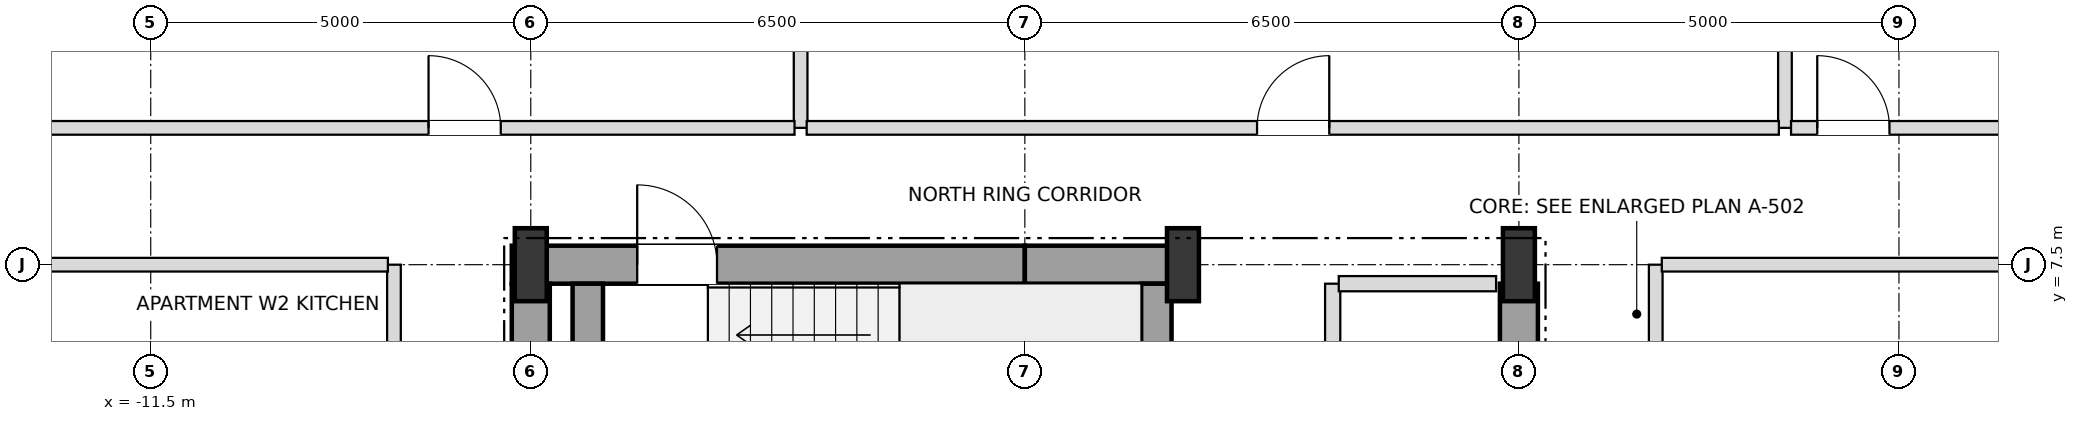
"""IFC4 building model, lengths in metres.
Left out: names, types, materials, properties, quantities, classifications, styles, units other than length and angle.
Written with IfcOpenShell. Run it as: python <this file> out.ifc"""

import sys

from ifc_helpers import new_model, si_unit, direction, frame, frame_2d, origin, origin_2d, place, context, subcontext, project, spatial, rectangle, i_section, extrude, element, fill, save


model = new_model("IFC4")
c1 = context("Model", 3, precision=1e-05, world=origin(), true_north=direction((0.0, 1.0)))
c2 = subcontext(c1, "Body", "Model", "MODEL_VIEW")
j1 = project(units=[si_unit("LENGTHUNIT", "METRE"), si_unit("PLANEANGLEUNIT", "RADIAN")], contexts=[c1])
p1 = place(None, origin())
s1 = spatial("IfcSite", under=j1, at=p1, CompositionType="ELEMENT")
p2 = place(p1, origin())
s2 = spatial("IfcBuilding", under=s1, at=p2, CompositionType="ELEMENT")
p3 = place(p2, frame((0.0, 0.0, 36.0)))
s3 = spatial("IfcBuildingStorey", under=s2, at=p3, CompositionType="ELEMENT", Elevation=36.0)
for number, where, z_axis, x_axis in (
    (1, (-6.5, 7.5, 0.0), (0.0, 0.0, 1.0), (1.0, 0.0, 0.0)),
    (2, (2.08, 7.5, 0.0), (0.0, 0.0, 1.0), (1.0, 0.0, 0.0)),
    (3, (6.5, 7.5, 0.0), (0.0, 0.0, 1.0), (1.0, 0.0, 0.0)),
):
    element("IfcColumn", number, at=place(p3, frame(where, z_axis=z_axis, x_axis=x_axis)), inside=s3, PredefinedType="COLUMN", context=c2, shape_type="SweptSolid", body=[
        extrude(i_section(OverallWidth=0.42, OverallDepth=0.96, WebThickness=0.022, FlangeThickness=0.034, at=origin_2d()), origin(), (0.0, 0.0, 1.0), 3.6),
    ])
p4 = place(p3, frame((-6.75, 7.5, 0.0), z_axis=(0.0, 0.0, 1.0), x_axis=(1.0, 0.0, 0.0)))
e4 = element("IfcWall", 4, at=p4, inside=s3, PredefinedType="SHEAR", context=c2, shape_type="SweptSolid", body=[
    extrude(rectangle(XDim=6.75, YDim=0.5, at=frame_2d((3.375, 0.0))), origin(), (0.0, 0.0, 1.0), 3.38),
])
p5 = place(p4, frame((1.65, 0.0, 0.0)))
e5 = element("IfcOpeningElement", 5, at=p5, cuts=e4, PredefinedType="OPENING", context=c2, shape_type="SweptSolid", body=[
    extrude(rectangle(XDim=1.05, YDim=2.15, at=frame_2d((0.525, 1.075))), frame((0.0, 0.26, 0.0), z_axis=(0.0, -1.0, 0.0), x_axis=(1.0, 0.0, 0.0)), (0.0, 0.0, 1.0), 0.52),
])
p6 = place(p3, frame((0.0, 7.5, 0.0), z_axis=(0.0, 0.0, 1.0), x_axis=(1.0, 0.0, 0.0)))
e6 = element("IfcWall", 6, at=p6, inside=s3, PredefinedType="SHEAR", context=c2, shape_type="SweptSolid", body=[
    extrude(rectangle(XDim=2.08, YDim=0.5, at=frame_2d((1.04, 0.0))), origin(), (0.0, 0.0, 1.0), 3.38),
])
for number, where, z_axis, x_axis in (
    (7, (-6.5, 3.95, 0.0), (0.0, 0.0, 1.0), (0.0, 1.0, 0.0)),
    (8, (6.5, 3.95, 0.0), (0.0, 0.0, 1.0), (0.0, 1.0, 0.0)),
):
    element("IfcWall", number, at=place(p3, frame(where, z_axis=z_axis, x_axis=x_axis)), inside=s3, PredefinedType="SHEAR", context=c2, shape_type="SweptSolid", body=[
        extrude(rectangle(XDim=3.3, YDim=0.5, at=frame_2d((1.65, 0.0))), origin(), (0.0, 0.0, 1.0), 3.38),
    ])
for number, where, z_axis, x_axis in (
    (9, (1.73, 3.95, 0.0), (0.0, 0.0, 1.0), (0.0, 1.0, 0.0)),
    (10, (-5.75, 3.95, 0.0), (0.0, 0.0, 1.0), (0.0, 1.0, 0.0)),
):
    element("IfcWall", number, at=place(p3, frame(where, z_axis=z_axis, x_axis=x_axis)), inside=s3, PredefinedType="SHEAR", context=c2, shape_type="SweptSolid", body=[
        extrude(rectangle(XDim=3.3, YDim=0.4, at=frame_2d((1.65, 0.0))), origin(), (0.0, 0.0, 1.0), 3.38),
    ])
p7 = place(p3, frame((-8.3, -7.5, 0.0), z_axis=(0.0, 0.0, 1.0), x_axis=(0.0, 1.0, 0.0)))
e11 = element("IfcWall", 11, at=p7, inside=s3, PredefinedType="PARTITIONING", context=c2, shape_type="SweptSolid", body=[
    extrude(rectangle(XDim=15.0, YDim=0.18, at=frame_2d((7.5, 0.0))), origin(), (0.0, 0.0, 1.0), 3.38),
])
p8 = place(p7, frame((3.565, 0.0, 0.0)))
e12 = element("IfcOpeningElement", 12, at=p8, cuts=e11, PredefinedType="OPENING", context=c2, shape_type="SweptSolid", body=[
    extrude(rectangle(XDim=0.95, YDim=2.15, at=frame_2d((0.475, 1.075))), frame((0.0, 0.1, 0.0), z_axis=(0.0, -1.0, 0.0), x_axis=(1.0, 0.0, 0.0)), (0.0, 0.0, 1.0), 0.2),
])
p9 = place(p7, frame((11.145, 0.0, 0.0)))
e13 = element("IfcOpeningElement", 13, at=p9, cuts=e11, PredefinedType="OPENING", context=c2, shape_type="SweptSolid", body=[
    extrude(rectangle(XDim=0.95, YDim=2.15, at=frame_2d((0.475, 1.075))), frame((0.0, 0.1, 0.0), z_axis=(0.0, -1.0, 0.0), x_axis=(1.0, 0.0, 0.0)), (0.0, 0.0, 1.0), 0.2),
])
p10 = place(p3, frame((-2.95, 9.3, 0.0), z_axis=(0.0, 0.0, 1.0), x_axis=(0.0, 1.0, 0.0)))
e14 = element("IfcWall", 14, at=p10, inside=s3, PredefinedType="PARTITIONING", context=c2, shape_type="SweptSolid", body=[
    extrude(rectangle(XDim=15.6, YDim=0.18, at=frame_2d((7.8, 0.0))), origin(), (0.0, 0.0, 1.0), 2.816),
])
p11 = place(p3, frame((4.05, 4.2, 0.0), z_axis=(0.0, 0.0, 1.0), x_axis=(0.0, 1.0, 0.0)))
e15 = element("IfcWall", 15, at=p11, inside=s3, PredefinedType="SOLIDWALL", context=c2, shape_type="SweptSolid", body=[
    extrude(rectangle(XDim=3.05, YDim=0.2, at=frame_2d((1.525, 0.0))), origin(), (0.0, 0.0, 1.0), 3.38),
])
p12 = place(p11, frame((0.975, 0.0, 0.0)))
e16 = element("IfcOpeningElement", 16, at=p12, cuts=e15, PredefinedType="OPENING", context=c2, shape_type="SweptSolid", body=[
    extrude(rectangle(XDim=0.95, YDim=2.15, at=frame_2d((0.475, 1.075))), frame((0.0, 0.11, 0.0), z_axis=(0.0, -1.0, 0.0), x_axis=(1.0, 0.0, 0.0)), (0.0, 0.0, 1.0), 0.22),
])
p13 = place(p3, frame((8.3, -7.5, 0.0), z_axis=(0.0, 0.0, 1.0), x_axis=(0.0, 1.0, 0.0)))
e17 = element("IfcWall", 17, at=p13, inside=s3, PredefinedType="PARTITIONING", context=c2, shape_type="SweptSolid", body=[
    extrude(rectangle(XDim=15.0, YDim=0.18, at=frame_2d((7.5, 0.0))), origin(), (0.0, 0.0, 1.0), 3.38),
])
p14 = place(p13, frame((3.475, 0.0, 0.0)))
e18 = element("IfcOpeningElement", 18, at=p14, cuts=e17, PredefinedType="OPENING", context=c2, shape_type="SweptSolid", body=[
    extrude(rectangle(XDim=0.95, YDim=2.15, at=frame_2d((0.475, 1.075))), frame((0.0, 0.1, 0.0), z_axis=(0.0, -1.0, 0.0), x_axis=(1.0, 0.0, 0.0)), (0.0, 0.0, 1.0), 0.2),
])
p15 = place(p3, frame((10.0, 9.3, 0.0), z_axis=(0.0, 0.0, 1.0), x_axis=(0.0, 1.0, 0.0)))
e19 = element("IfcWall", 19, at=p15, inside=s3, PredefinedType="PARTITIONING", context=c2, shape_type="SweptSolid", body=[
    extrude(rectangle(XDim=15.6, YDim=0.18, at=frame_2d((7.8, 0.0))), origin(), (0.0, 0.0, 1.0), 2.816),
])
p16 = place(p15, frame((8.635, 0.0, 0.0)))
e20 = element("IfcOpeningElement", 20, at=p16, cuts=e19, PredefinedType="OPENING", context=c2, shape_type="SweptSolid", body=[
    extrude(rectangle(XDim=0.95, YDim=2.15, at=frame_2d((0.475, 1.075))), frame((0.0, 0.1, 0.0), z_axis=(0.0, -1.0, 0.0), x_axis=(1.0, 0.0, 0.0)), (0.0, 0.0, 1.0), 0.2),
])
p17 = place(p3, frame((4.13, 7.25, 0.0), z_axis=(0.0, 0.0, 1.0), x_axis=(1.0, 0.0, 0.0)))
e21 = element("IfcWall", 21, at=p17, inside=s3, PredefinedType="SOLIDWALL", context=c2, shape_type="SweptSolid", body=[
    extrude(rectangle(XDim=2.07, YDim=0.2, at=frame_2d((1.035, 0.0))), origin(), (0.0, 0.0, 1.0), 3.38),
])
for number, where, z_axis, x_axis in (
    (22, (-16.02, 7.5, 0.0), (0.0, 0.0, 1.0), (1.0, 0.0, 0.0)),
    (23, (8.38, 7.5, 0.0), (0.0, 0.0, 1.0), (1.0, 0.0, 0.0)),
):
    element("IfcWall", number, at=place(p3, frame(where, z_axis=z_axis, x_axis=x_axis)), inside=s3, PredefinedType="PARTITIONING", context=c2, shape_type="SweptSolid", body=[
        extrude(rectangle(XDim=7.64, YDim=0.18, at=frame_2d((3.82, 0.0))), origin(), (0.0, 0.0, 1.0), 2.816),
    ])
p18 = place(p3, frame((-18.4, 9.3, 0.0), z_axis=(0.0, 0.0, 1.0), x_axis=(1.0, 0.0, 0.0)))
e24 = element("IfcWall", 24, at=p18, inside=s3, PredefinedType="PARTITIONING", context=c2, shape_type="SweptSolid", body=[
    extrude(rectangle(XDim=15.37, YDim=0.18, at=frame_2d((7.685, 0.0))), origin(), (0.0, 0.0, 1.0), 2.816),
])
p19 = place(p18, frame((10.555, 0.0, 0.0)))
e25 = element("IfcOpeningElement", 25, at=p19, cuts=e24, PredefinedType="OPENING", context=c2, shape_type="SweptSolid", body=[
    extrude(rectangle(XDim=0.95, YDim=2.15, at=frame_2d((0.475, 1.075))), frame((0.0, 0.1, 0.0), z_axis=(0.0, -1.0, 0.0), x_axis=(1.0, 0.0, 0.0)), (0.0, 0.0, 1.0), 0.2),
])
p20 = place(p3, frame((-2.87, 9.3, 0.0), z_axis=(0.0, 0.0, 1.0), x_axis=(1.0, 0.0, 0.0)))
e26 = element("IfcWall", 26, at=p20, inside=s3, PredefinedType="PARTITIONING", context=c2, shape_type="SweptSolid", body=[
    extrude(rectangle(XDim=12.79, YDim=0.18, at=frame_2d((6.395, 0.0))), origin(), (0.0, 0.0, 1.0), 2.816),
])
p21 = place(p20, frame((5.925, 0.0, 0.0)))
e27 = element("IfcOpeningElement", 27, at=p21, cuts=e26, PredefinedType="OPENING", context=c2, shape_type="SweptSolid", body=[
    extrude(rectangle(XDim=0.95, YDim=2.15, at=frame_2d((0.475, 1.075))), frame((0.0, 0.1, 0.0), z_axis=(0.0, -1.0, 0.0), x_axis=(1.0, 0.0, 0.0)), (0.0, 0.0, 1.0), 0.2),
])
p22 = place(p3, frame((10.08, 9.3, 0.0), z_axis=(0.0, 0.0, 1.0), x_axis=(1.0, 0.0, 0.0)))
e28 = element("IfcWall", 28, at=p22, inside=s3, PredefinedType="PARTITIONING", context=c2, shape_type="SweptSolid", body=[
    extrude(rectangle(XDim=8.24, YDim=0.18, at=frame_2d((4.12, 0.0))), origin(), (0.0, 0.0, 1.0), 2.816),
])
p23 = place(p22, frame((0.345, 0.0, 0.0)))
e29 = element("IfcOpeningElement", 29, at=p23, cuts=e28, PredefinedType="OPENING", context=c2, shape_type="SweptSolid", body=[
    extrude(rectangle(XDim=0.95, YDim=2.15, at=frame_2d((0.475, 1.075))), frame((0.0, 0.1, 0.0), z_axis=(0.0, -1.0, 0.0), x_axis=(1.0, 0.0, 0.0)), (0.0, 0.0, 1.0), 0.2),
])
p24 = place(p5, origin())
e30 = element("IfcDoor", 30, at=p24, inside=s3, OperationType="SINGLE_SWING_LEFT", PredefinedType="DOOR", context=c2, shape_type="SweptSolid", body=[
    extrude(rectangle(XDim=1.05, YDim=2.15, at=frame_2d((0.525, 1.075))), frame((0.0, 0.025, 0.0), z_axis=(0.0, -1.0, 0.0), x_axis=(1.0, 0.0, 0.0)), (0.0, 0.0, 1.0), 0.05),
])
fill(e5, e30)
p25 = place(p23, origin())
e31 = element("IfcDoor", 31, at=p25, inside=s3, OperationType="SINGLE_SWING_LEFT", PredefinedType="DOOR", context=c2, shape_type="SweptSolid", body=[
    extrude(rectangle(XDim=0.95, YDim=2.15, at=frame_2d((0.475, 1.075))), frame((0.0, 0.025, 0.0), z_axis=(0.0, -1.0, 0.0), x_axis=(1.0, 0.0, 0.0)), (0.0, 0.0, 1.0), 0.05),
])
fill(e29, e31)
p26 = place(p19, origin())
e32 = element("IfcDoor", 32, at=p26, inside=s3, OperationType="SINGLE_SWING_LEFT", PredefinedType="DOOR", context=c2, shape_type="SweptSolid", body=[
    extrude(rectangle(XDim=0.95, YDim=2.15, at=frame_2d((0.475, 1.075))), frame((0.0, 0.025, 0.0), z_axis=(0.0, -1.0, 0.0), x_axis=(1.0, 0.0, 0.0)), (0.0, 0.0, 1.0), 0.05),
])
fill(e25, e32)
p27 = place(p21, origin())
e33 = element("IfcDoor", 33, at=p27, inside=s3, OperationType="SINGLE_SWING_RIGHT", PredefinedType="DOOR", context=c2, shape_type="SweptSolid", body=[
    extrude(rectangle(XDim=0.95, YDim=2.15, at=frame_2d((0.475, 1.075))), frame((0.0, 0.025, 0.0), z_axis=(0.0, -1.0, 0.0), x_axis=(1.0, 0.0, 0.0)), (0.0, 0.0, 1.0), 0.05),
])
fill(e27, e33)
save(model, sys.argv[1])
